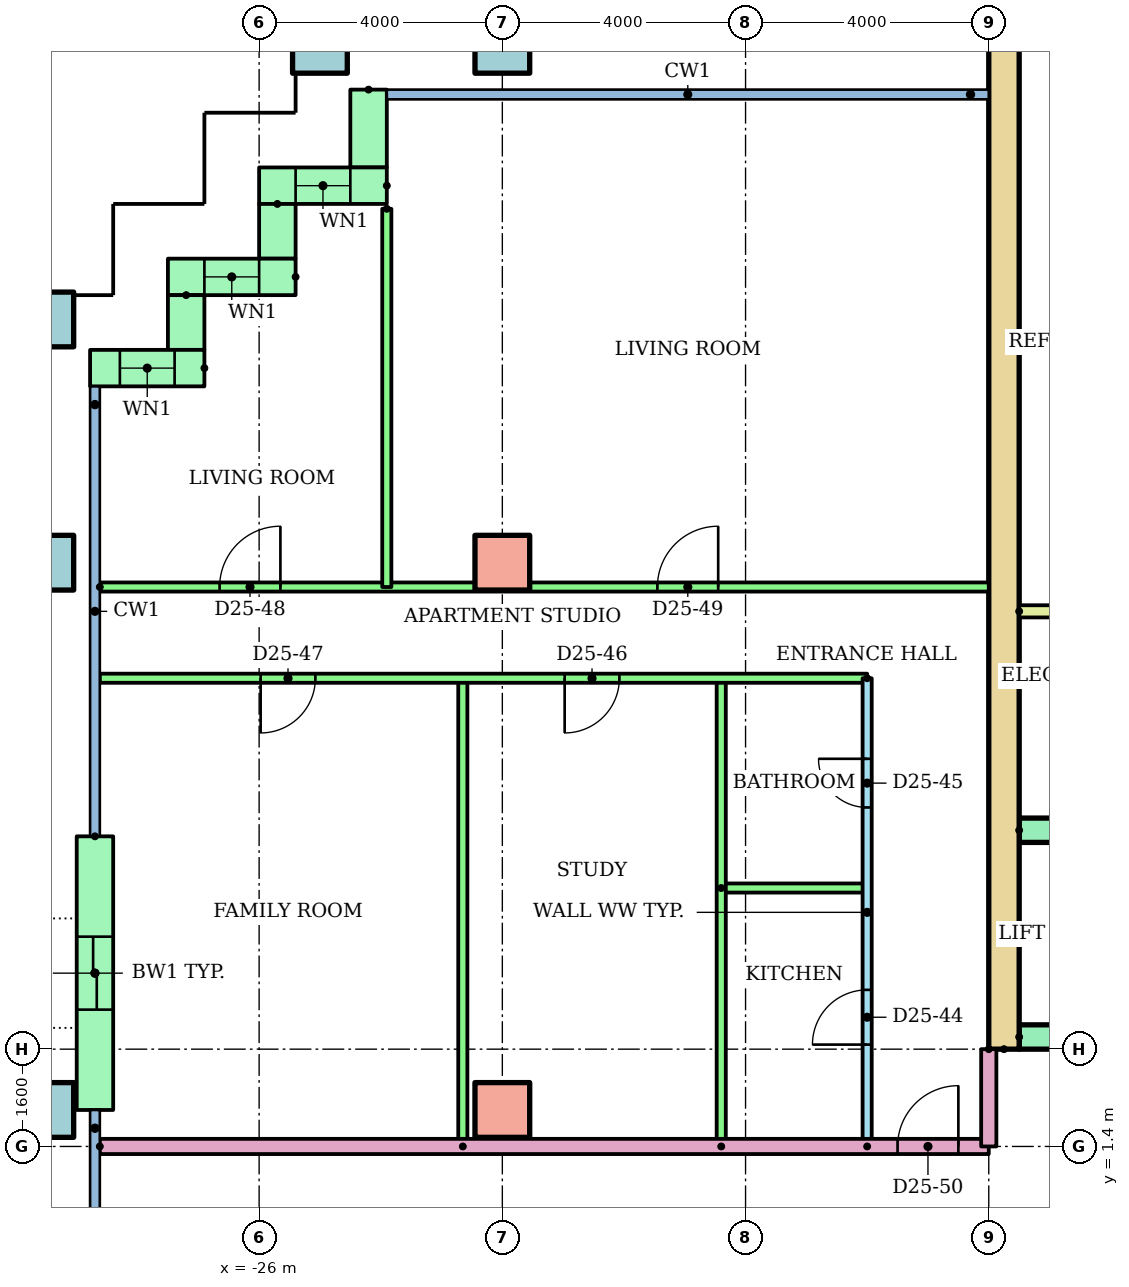
"""IFC4 building model, lengths in metres.
Left out: names, types, materials, properties, quantities, classifications, styles, units other than length and angle.
Written with IfcOpenShell. Run it as: python <this file> out.ifc"""

import sys

from ifc_helpers import new_model, si_unit, direction, frame, frame_2d, origin, origin_2d, place, context, subcontext, project, spatial, rectangle, hollow_rectangle, extrude, element, fill, save


model = new_model("IFC4")
c1 = context("Model", 3, precision=1e-05, world=origin(), true_north=direction((0.0, 1.0)))
c2 = subcontext(c1, "Body", "Model", "MODEL_VIEW")
j1 = project(units=[si_unit("LENGTHUNIT", "METRE"), si_unit("PLANEANGLEUNIT", "RADIAN")], contexts=[c1])
p1 = place(None, origin())
s1 = spatial("IfcSite", under=j1, at=p1, CompositionType="ELEMENT")
p2 = place(p1, origin())
s2 = spatial("IfcBuilding", under=s1, at=p2, CompositionType="ELEMENT")
p3 = place(p2, frame((0.0, 0.0, 96.7)))
s3 = spatial("IfcBuildingStorey", under=s2, at=p3, CompositionType="ELEMENT", Elevation=96.7)
p4 = place(p3, frame((-29.5, 2.0, 0.0)))
e1 = element("IfcColumn", 1, at=p4, inside=s3, PredefinedType="COLUMN", context=c2, shape_type="SweptSolid", body=[
    extrude(hollow_rectangle(XDim=0.9, YDim=0.9, WallThickness=0.045, at=origin_2d()), origin(), (0.0, 0.0, 1.0), 3.2),
])
p5 = place(p3, frame((-22.0, 2.0, 0.0)))
e2 = element("IfcColumn", 2, at=p5, inside=s3, PredefinedType="COLUMN", context=c2, shape_type="SweptSolid", body=[
    extrude(rectangle(XDim=0.9, YDim=0.9, at=origin_2d()), origin(), (0.0, 0.0, 1.0), 3.2),
])
p6 = place(p3, frame((-29.5, 11.0, 0.0)))
e3 = element("IfcColumn", 3, at=p6, inside=s3, PredefinedType="COLUMN", context=c2, shape_type="SweptSolid", body=[
    extrude(hollow_rectangle(XDim=0.9, YDim=0.9, WallThickness=0.045, at=origin_2d()), origin(), (0.0, 0.0, 1.0), 3.2),
])
p7 = place(p3, frame((-22.0, 11.0, 0.0)))
e4 = element("IfcColumn", 4, at=p7, inside=s3, PredefinedType="COLUMN", context=c2, shape_type="SweptSolid", body=[
    extrude(rectangle(XDim=0.9, YDim=0.9, at=origin_2d()), origin(), (0.0, 0.0, 1.0), 3.2),
])
for number, where in (
    (5, (-29.5, 15.0, 0.0)),
    (6, (-25.0, 19.5, 0.0)),
    (7, (-22.0, 19.5, 0.0)),
):
    element("IfcColumn", number, at=place(p3, frame(where)), inside=s3, PredefinedType="COLUMN", context=c2, shape_type="SweptSolid", body=[
        extrude(hollow_rectangle(XDim=0.9, YDim=0.9, WallThickness=0.045, at=origin_2d()), origin(), (0.0, 0.0, 1.0), 3.2),
    ])
p8 = place(p3, frame((-24.2, 18.78, 0.0), z_axis=(0.0, 0.0, 1.0), x_axis=(0.0, -1.0, 0.0)))
e8 = element("IfcWall", 8, at=p8, inside=s3, PredefinedType="STANDARD", context=c2, shape_type="SweptSolid", body=[
    extrude(rectangle(XDim=1.28, YDim=0.6, at=frame_2d((0.64, 0.0))), origin(), (0.0, 0.0, 1.0), 2.92),
])
p9 = place(p3, frame((-23.9, 17.2, 0.0), z_axis=(0.0, 0.0, 1.0), x_axis=(-1.0, 0.0, 0.0)))
e9 = element("IfcWall", 9, at=p9, inside=s3, PredefinedType="STANDARD", context=c2, shape_type="SweptSolid", body=[
    extrude(rectangle(XDim=2.1, YDim=0.6, at=frame_2d((1.05, 0.0))), origin(), (0.0, 0.0, 1.0), 2.92),
])
p10 = place(p9, frame((0.6, 0.0, 0.9)))
e10 = element("IfcOpeningElement", 10, at=p10, cuts=e9, PredefinedType="OPENING", context=c2, shape_type="SweptSolid", body=[
    extrude(rectangle(XDim=0.9, YDim=1.5, at=frame_2d((0.45, 0.75))), frame((0.0, 0.31, 0.0), z_axis=(0.0, -1.0, 0.0), x_axis=(1.0, 0.0, 0.0)), (0.0, 0.0, 1.0), 0.62),
])
p11 = place(p3, frame((-25.7, 16.9, 0.0), z_axis=(0.0, 0.0, 1.0), x_axis=(0.0, -1.0, 0.0)))
e11 = element("IfcWall", 11, at=p11, inside=s3, PredefinedType="STANDARD", context=c2, shape_type="SweptSolid", body=[
    extrude(rectangle(XDim=0.9, YDim=0.6, at=frame_2d((0.45, 0.0))), origin(), (0.0, 0.0, 1.0), 2.92),
])
p12 = place(p3, frame((-25.4, 15.7, 0.0), z_axis=(0.0, 0.0, 1.0), x_axis=(-1.0, 0.0, 0.0)))
e12 = element("IfcWall", 12, at=p12, inside=s3, PredefinedType="STANDARD", context=c2, shape_type="SweptSolid", body=[
    extrude(rectangle(XDim=2.1, YDim=0.6, at=frame_2d((1.05, 0.0))), origin(), (0.0, 0.0, 1.0), 2.92),
])
p13 = place(p12, frame((0.6, 0.0, 0.9)))
e13 = element("IfcOpeningElement", 13, at=p13, cuts=e12, PredefinedType="OPENING", context=c2, shape_type="SweptSolid", body=[
    extrude(rectangle(XDim=0.9, YDim=1.5, at=frame_2d((0.45, 0.75))), frame((0.0, 0.31, 0.0), z_axis=(0.0, -1.0, 0.0), x_axis=(1.0, 0.0, 0.0)), (0.0, 0.0, 1.0), 0.62),
])
p14 = place(p3, frame((-27.2, 15.4, 0.0), z_axis=(0.0, 0.0, 1.0), x_axis=(0.0, -1.0, 0.0)))
e14 = element("IfcWall", 14, at=p14, inside=s3, PredefinedType="STANDARD", context=c2, shape_type="SweptSolid", body=[
    extrude(rectangle(XDim=0.9, YDim=0.6, at=frame_2d((0.45, 0.0))), origin(), (0.0, 0.0, 1.0), 2.92),
])
p15 = place(p3, frame((-26.9, 14.2, 0.0), z_axis=(0.0, 0.0, 1.0), x_axis=(-1.0, 0.0, 0.0)))
e15 = element("IfcWall", 15, at=p15, inside=s3, PredefinedType="STANDARD", context=c2, shape_type="SweptSolid", body=[
    extrude(rectangle(XDim=1.88, YDim=0.6, at=frame_2d((0.94, 0.0))), origin(), (0.0, 0.0, 1.0), 2.92),
])
p16 = place(p15, frame((0.49, 0.0, 0.9)))
e16 = element("IfcOpeningElement", 16, at=p16, cuts=e15, PredefinedType="OPENING", context=c2, shape_type="SweptSolid", body=[
    extrude(rectangle(XDim=0.9, YDim=1.5, at=frame_2d((0.45, 0.75))), frame((0.0, 0.31, 0.0), z_axis=(0.0, -1.0, 0.0), x_axis=(1.0, 0.0, 0.0)), (0.0, 0.0, 1.0), 0.62),
])
p17 = place(p3, frame((-28.7, 6.5, 0.0), z_axis=(0.0, 0.0, 1.0), x_axis=(0.0, -1.0, 0.0)))
e17 = element("IfcWall", 17, at=p17, inside=s3, PredefinedType="STANDARD", context=c2, shape_type="SweptSolid", body=[
    extrude(rectangle(XDim=4.5, YDim=0.6, at=frame_2d((2.25, 0.0))), origin(), (0.0, 0.0, 1.0), 2.92),
])
p18 = place(p17, frame((1.65, 0.0, 0.0)))
e18 = element("IfcOpeningElement", 18, at=p18, cuts=e17, PredefinedType="OPENING", context=c2, shape_type="SweptSolid", body=[
    extrude(rectangle(XDim=1.2, YDim=2.1, at=frame_2d((0.6, 1.05))), frame((0.0, 0.31, 0.0), z_axis=(0.0, -1.0, 0.0), x_axis=(1.0, 0.0, 0.0)), (0.0, 0.0, 1.0), 0.62),
])
p19 = place(p3, frame((-13.75, 3.0, 0.0), z_axis=(0.0, 0.0, 1.0), x_axis=(0.0, 1.0, 0.0)))
e19 = element("IfcWall", 19, at=p19, inside=s3, PredefinedType="SHEAR", context=c2, shape_type="SweptSolid", body=[
    extrude(rectangle(XDim=17.0, YDim=0.5, at=frame_2d((8.5, 0.0))), origin(), (0.0, 0.0, 1.0), 2.92),
])
p20 = place(p3, frame((-13.5, 3.2, 0.0)))
e20 = element("IfcWall", 20, at=p20, inside=s3, PredefinedType="SHEAR", context=c2, shape_type="SweptSolid", body=[
    extrude(rectangle(XDim=27.0, YDim=0.4, at=frame_2d((13.5, 0.0))), origin(), (0.0, 0.0, 1.0), 2.92),
])
p21 = place(p20, frame((6.861, 0.0, 0.0)))
e21 = element("IfcOpeningElement", 21, at=p21, cuts=e20, PredefinedType="OPENING", context=c2, shape_type="SweptSolid", body=[
    extrude(rectangle(XDim=1.1, YDim=2.1, at=frame_2d((0.55, 1.05))), frame((0.0, 0.21, 0.0), z_axis=(0.0, -1.0, 0.0), x_axis=(1.0, 0.0, 0.0)), (0.0, 0.0, 1.0), 0.42),
])
p22 = place(p20, frame((9.906, 0.0, 0.0)))
e22 = element("IfcOpeningElement", 22, at=p22, cuts=e20, PredefinedType="OPENING", context=c2, shape_type="SweptSolid", body=[
    extrude(rectangle(XDim=1.1, YDim=2.1, at=frame_2d((0.55, 1.05))), frame((0.0, 0.21, 0.0), z_axis=(0.0, -1.0, 0.0), x_axis=(1.0, 0.0, 0.0)), (0.0, 0.0, 1.0), 0.42),
])
p23 = place(p20, frame((15.994, 0.0, 0.0)))
e23 = element("IfcOpeningElement", 23, at=p23, cuts=e20, PredefinedType="OPENING", context=c2, shape_type="SweptSolid", body=[
    extrude(rectangle(XDim=1.1, YDim=2.1, at=frame_2d((0.55, 1.05))), frame((0.0, 0.21, 0.0), z_axis=(0.0, -1.0, 0.0), x_axis=(1.0, 0.0, 0.0)), (0.0, 0.0, 1.0), 0.42),
])
p24 = place(p20, frame((19.039, 0.0, 0.0)))
e24 = element("IfcOpeningElement", 24, at=p24, cuts=e20, PredefinedType="OPENING", context=c2, shape_type="SweptSolid", body=[
    extrude(rectangle(XDim=1.1, YDim=2.1, at=frame_2d((0.55, 1.05))), frame((0.0, 0.21, 0.0), z_axis=(0.0, -1.0, 0.0), x_axis=(1.0, 0.0, 0.0)), (0.0, 0.0, 1.0), 0.42),
])
p25 = place(p20, frame((12.6, 0.0, 0.0)))
e25 = element("IfcOpeningElement", 25, at=p25, cuts=e20, PredefinedType="OPENING", context=c2, shape_type="SweptSolid", body=[
    extrude(rectangle(XDim=1.8, YDim=2.1, at=frame_2d((0.9, 1.05))), frame((0.0, 0.21, 0.0), z_axis=(0.0, -1.0, 0.0), x_axis=(1.0, 0.0, 0.0)), (0.0, 0.0, 1.0), 0.42),
])
p26 = place(p3, frame((-13.5, 6.6, 0.0)))
e26 = element("IfcWall", 26, at=p26, inside=s3, PredefinedType="SHEAR", context=c2, shape_type="SweptSolid", body=[
    extrude(rectangle(XDim=11.978, YDim=0.4, at=frame_2d((5.989, 0.0))), origin(), (0.0, 0.0, 1.0), 2.92),
])
p27 = place(p3, frame((-13.5, 10.2, 0.0)))
e27 = element("IfcWall", 27, at=p27, inside=s3, PredefinedType="PARTITIONING", context=c2, shape_type="SweptSolid", body=[
    extrude(rectangle(XDim=3.9, YDim=0.2, at=frame_2d((1.95, 0.0))), origin(), (0.0, 0.0, 1.0), 2.92),
])
p28 = place(p3, frame((-16.0, 1.4, 0.0), z_axis=(0.0, 0.0, 1.0), x_axis=(0.0, 1.0, 0.0)))
e28 = element("IfcWall", 28, at=p28, inside=s3, PredefinedType="PARTITIONING", context=c2, shape_type="SweptSolid", body=[
    extrude(rectangle(XDim=7.7, YDim=0.15, at=frame_2d((3.85, 0.0))), origin(), (0.0, 0.0, 1.0), 2.4),
])
p29 = place(p28, frame((1.675, 0.0, 0.0)))
e29 = element("IfcOpeningElement", 29, at=p29, cuts=e28, PredefinedType="OPENING", context=c2, shape_type="SweptSolid", body=[
    extrude(rectangle(XDim=0.9, YDim=2.1, at=frame_2d((0.45, 1.05))), frame((0.0, 0.085, 0.0), z_axis=(0.0, -1.0, 0.0), x_axis=(1.0, 0.0, 0.0)), (0.0, 0.0, 1.0), 0.17),
])
p30 = place(p28, frame((5.575, 0.0, 0.0)))
e30 = element("IfcOpeningElement", 30, at=p30, cuts=e28, PredefinedType="OPENING", context=c2, shape_type="SweptSolid", body=[
    extrude(rectangle(XDim=0.8, YDim=2.1, at=frame_2d((0.4, 1.05))), frame((0.0, 0.085, 0.0), z_axis=(0.0, -1.0, 0.0), x_axis=(1.0, 0.0, 0.0)), (0.0, 0.0, 1.0), 0.17),
])
p31 = place(p3, frame((-18.4, 5.65, 0.0)))
e31 = element("IfcWall", 31, at=p31, inside=s3, PredefinedType="PARTITIONING", context=c2, shape_type="SweptSolid", body=[
    extrude(rectangle(XDim=2.4, YDim=0.15, at=frame_2d((1.2, 0.0))), origin(), (0.0, 0.0, 1.0), 2.4),
])
for number, where, z_axis, x_axis in (
    (32, (-18.4, 1.4, 0.0), (0.0, 0.0, 1.0), (0.0, 1.0, 0.0)),
    (33, (-22.65, 1.4, 0.0), (0.0, 0.0, 1.0), (0.0, 1.0, 0.0)),
):
    element("IfcWall", number, at=place(p3, frame(where, z_axis=z_axis, x_axis=x_axis)), inside=s3, PredefinedType="PARTITIONING", context=c2, shape_type="SweptSolid", body=[
        extrude(rectangle(XDim=7.7, YDim=0.15, at=frame_2d((3.85, 0.0))), origin(), (0.0, 0.0, 1.0), 2.4),
    ])
p32 = place(p3, frame((-16.0, 9.1, 0.0), z_axis=(0.0, 0.0, 1.0), x_axis=(-1.0, 0.0, 0.0)))
e34 = element("IfcWall", 34, at=p32, inside=s3, PredefinedType="PARTITIONING", context=c2, shape_type="SweptSolid", body=[
    extrude(rectangle(XDim=12.62, YDim=0.15, at=frame_2d((6.31, 0.0))), origin(), (0.0, 0.0, 1.0), 2.4),
])
p33 = place(p32, frame((4.075, 0.0, 0.0)))
e35 = element("IfcOpeningElement", 35, at=p33, cuts=e34, PredefinedType="OPENING", context=c2, shape_type="SweptSolid", body=[
    extrude(rectangle(XDim=0.9, YDim=2.1, at=frame_2d((0.45, 1.05))), frame((0.0, 0.085, 0.0), z_axis=(0.0, -1.0, 0.0), x_axis=(1.0, 0.0, 0.0)), (0.0, 0.0, 1.0), 0.17),
])
p34 = place(p32, frame((9.075, 0.0, 0.0)))
e36 = element("IfcOpeningElement", 36, at=p34, cuts=e34, PredefinedType="OPENING", context=c2, shape_type="SweptSolid", body=[
    extrude(rectangle(XDim=0.9, YDim=2.1, at=frame_2d((0.45, 1.05))), frame((0.0, 0.085, 0.0), z_axis=(0.0, -1.0, 0.0), x_axis=(1.0, 0.0, 0.0)), (0.0, 0.0, 1.0), 0.17),
])
p35 = place(p3, frame((-28.62, 10.6, 0.0)))
e37 = element("IfcWall", 37, at=p35, inside=s3, PredefinedType="PARTITIONING", context=c2, shape_type="SweptSolid", body=[
    extrude(rectangle(XDim=14.62, YDim=0.15, at=frame_2d((7.31, 0.0))), origin(), (0.0, 0.0, 1.0), 2.4),
])
p36 = place(p35, frame((1.97, 0.0, 0.0)))
e38 = element("IfcOpeningElement", 38, at=p36, cuts=e37, PredefinedType="OPENING", context=c2, shape_type="SweptSolid", body=[
    extrude(rectangle(XDim=1.0, YDim=2.1, at=frame_2d((0.5, 1.05))), frame((0.0, 0.085, 0.0), z_axis=(0.0, -1.0, 0.0), x_axis=(1.0, 0.0, 0.0)), (0.0, 0.0, 1.0), 0.17),
])
p37 = place(p35, frame((9.17, 0.0, 0.0)))
e39 = element("IfcOpeningElement", 39, at=p37, cuts=e37, PredefinedType="OPENING", context=c2, shape_type="SweptSolid", body=[
    extrude(rectangle(XDim=1.0, YDim=2.1, at=frame_2d((0.5, 1.05))), frame((0.0, 0.085, 0.0), z_axis=(0.0, -1.0, 0.0), x_axis=(1.0, 0.0, 0.0)), (0.0, 0.0, 1.0), 0.17),
])
p38 = place(p3, frame((-23.9, 16.82, 0.0), z_axis=(0.0, 0.0, 1.0), x_axis=(0.0, -1.0, 0.0)))
e40 = element("IfcWall", 40, at=p38, inside=s3, PredefinedType="PARTITIONING", context=c2, shape_type="SweptSolid", body=[
    extrude(rectangle(XDim=6.22, YDim=0.15, at=frame_2d((3.11, 0.0))), origin(), (0.0, 0.0, 1.0), 2.4),
])
p39 = place(p3, frame((-28.62, 1.4, 0.0)))
e41 = element("IfcWall", 41, at=p39, inside=s3, PredefinedType="PARTITIONING", context=c2, shape_type="SweptSolid", body=[
    extrude(rectangle(XDim=14.62, YDim=0.25, at=frame_2d((7.31, 0.0))), origin(), (0.0, 0.0, 1.0), 2.4),
])
p40 = place(p39, frame((13.12, 0.0, 0.0)))
e42 = element("IfcOpeningElement", 42, at=p40, cuts=e41, PredefinedType="OPENING", context=c2, shape_type="SweptSolid", body=[
    extrude(rectangle(XDim=1.0, YDim=2.1, at=frame_2d((0.5, 1.05))), frame((0.0, 0.135, 0.0), z_axis=(0.0, -1.0, 0.0), x_axis=(1.0, 0.0, 0.0)), (0.0, 0.0, 1.0), 0.27),
])
p41 = place(p3, frame((-14.0, 3.0, 0.0), z_axis=(0.0, 0.0, 1.0), x_axis=(0.0, -1.0, 0.0)))
e43 = element("IfcWall", 43, at=p41, inside=s3, PredefinedType="PARTITIONING", context=c2, shape_type="SweptSolid", body=[
    extrude(rectangle(XDim=1.6, YDim=0.25, at=frame_2d((0.8, 0.0))), origin(), (0.0, 0.0, 1.0), 2.4),
])
p42 = place(p10, origin())
e44 = element("IfcWindow", 44, at=p42, inside=s3, PartitioningType="SINGLE_PANEL", PredefinedType="WINDOW", context=c2, shape_type="SweptSolid", body=[
    extrude(rectangle(XDim=0.9, YDim=1.5, at=frame_2d((0.45, 0.75))), frame((0.0, 0.03, 0.0), z_axis=(0.0, -1.0, 0.0), x_axis=(1.0, 0.0, 0.0)), (0.0, 0.0, 1.0), 0.06),
])
fill(e10, e44)
p43 = place(p13, origin())
e45 = element("IfcWindow", 45, at=p43, inside=s3, PartitioningType="SINGLE_PANEL", PredefinedType="WINDOW", context=c2, shape_type="SweptSolid", body=[
    extrude(rectangle(XDim=0.9, YDim=1.5, at=frame_2d((0.45, 0.75))), frame((0.0, 0.03, 0.0), z_axis=(0.0, -1.0, 0.0), x_axis=(1.0, 0.0, 0.0)), (0.0, 0.0, 1.0), 0.06),
])
fill(e13, e45)
p44 = place(p16, origin())
e46 = element("IfcWindow", 46, at=p44, inside=s3, PartitioningType="SINGLE_PANEL", PredefinedType="WINDOW", context=c2, shape_type="SweptSolid", body=[
    extrude(rectangle(XDim=0.9, YDim=1.5, at=frame_2d((0.45, 0.75))), frame((0.0, 0.03, 0.0), z_axis=(0.0, -1.0, 0.0), x_axis=(1.0, 0.0, 0.0)), (0.0, 0.0, 1.0), 0.06),
])
fill(e16, e46)
p45 = place(p29, origin())
e47 = element("IfcDoor", 47, at=p45, inside=s3, OperationType="SINGLE_SWING_LEFT", PredefinedType="DOOR", context=c2, shape_type="SweptSolid", body=[
    extrude(rectangle(XDim=0.9, YDim=2.1, at=frame_2d((0.45, 1.05))), frame((0.0, 0.025, 0.0), z_axis=(0.0, -1.0, 0.0), x_axis=(1.0, 0.0, 0.0)), (0.0, 0.0, 1.0), 0.05),
])
fill(e29, e47)
p46 = place(p30, origin())
e48 = element("IfcDoor", 48, at=p46, inside=s3, OperationType="SINGLE_SWING_RIGHT", PredefinedType="DOOR", context=c2, shape_type="SweptSolid", body=[
    extrude(rectangle(XDim=0.8, YDim=2.1, at=frame_2d((0.4, 1.05))), frame((0.0, 0.025, 0.0), z_axis=(0.0, -1.0, 0.0), x_axis=(1.0, 0.0, 0.0)), (0.0, 0.0, 1.0), 0.05),
])
fill(e30, e48)
p47 = place(p33, origin())
e49 = element("IfcDoor", 49, at=p47, inside=s3, OperationType="SINGLE_SWING_RIGHT", PredefinedType="DOOR", context=c2, shape_type="SweptSolid", body=[
    extrude(rectangle(XDim=0.9, YDim=2.1, at=frame_2d((0.45, 1.05))), frame((0.0, 0.025, 0.0), z_axis=(0.0, -1.0, 0.0), x_axis=(1.0, 0.0, 0.0)), (0.0, 0.0, 1.0), 0.05),
])
fill(e35, e49)
p48 = place(p34, origin())
e50 = element("IfcDoor", 50, at=p48, inside=s3, OperationType="SINGLE_SWING_RIGHT", PredefinedType="DOOR", context=c2, shape_type="SweptSolid", body=[
    extrude(rectangle(XDim=0.9, YDim=2.1, at=frame_2d((0.45, 1.05))), frame((0.0, 0.025, 0.0), z_axis=(0.0, -1.0, 0.0), x_axis=(1.0, 0.0, 0.0)), (0.0, 0.0, 1.0), 0.05),
])
fill(e36, e50)
p49 = place(p36, origin())
e51 = element("IfcDoor", 51, at=p49, inside=s3, OperationType="SINGLE_SWING_RIGHT", PredefinedType="DOOR", context=c2, shape_type="SweptSolid", body=[
    extrude(rectangle(XDim=1.0, YDim=2.1, at=frame_2d((0.5, 1.05))), frame((0.0, 0.025, 0.0), z_axis=(0.0, -1.0, 0.0), x_axis=(1.0, 0.0, 0.0)), (0.0, 0.0, 1.0), 0.05),
])
fill(e38, e51)
p50 = place(p37, origin())
e52 = element("IfcDoor", 52, at=p50, inside=s3, OperationType="SINGLE_SWING_RIGHT", PredefinedType="DOOR", context=c2, shape_type="SweptSolid", body=[
    extrude(rectangle(XDim=1.0, YDim=2.1, at=frame_2d((0.5, 1.05))), frame((0.0, 0.025, 0.0), z_axis=(0.0, -1.0, 0.0), x_axis=(1.0, 0.0, 0.0)), (0.0, 0.0, 1.0), 0.05),
])
fill(e39, e52)
p51 = place(p40, origin())
e53 = element("IfcDoor", 53, at=p51, inside=s3, OperationType="SINGLE_SWING_RIGHT", PredefinedType="DOOR", context=c2, shape_type="SweptSolid", body=[
    extrude(rectangle(XDim=1.0, YDim=2.1, at=frame_2d((0.5, 1.05))), frame((0.0, 0.025, 0.0), z_axis=(0.0, -1.0, 0.0), x_axis=(1.0, 0.0, 0.0)), (0.0, 0.0, 1.0), 0.05),
])
fill(e42, e53)
p52 = place(p18, origin())
e54 = element("IfcDoor", 54, at=p52, inside=s3, OperationType="SLIDING_TO_LEFT", PredefinedType="DOOR", context=c2, shape_type="SweptSolid", body=[
    extrude(rectangle(XDim=1.2, YDim=2.1, at=frame_2d((0.6, 1.05))), frame((0.0, 0.025, 0.0), z_axis=(0.0, -1.0, 0.0), x_axis=(1.0, 0.0, 0.0)), (0.0, 0.0, 1.0), 0.05),
])
fill(e18, e54)
save(model, sys.argv[1])
